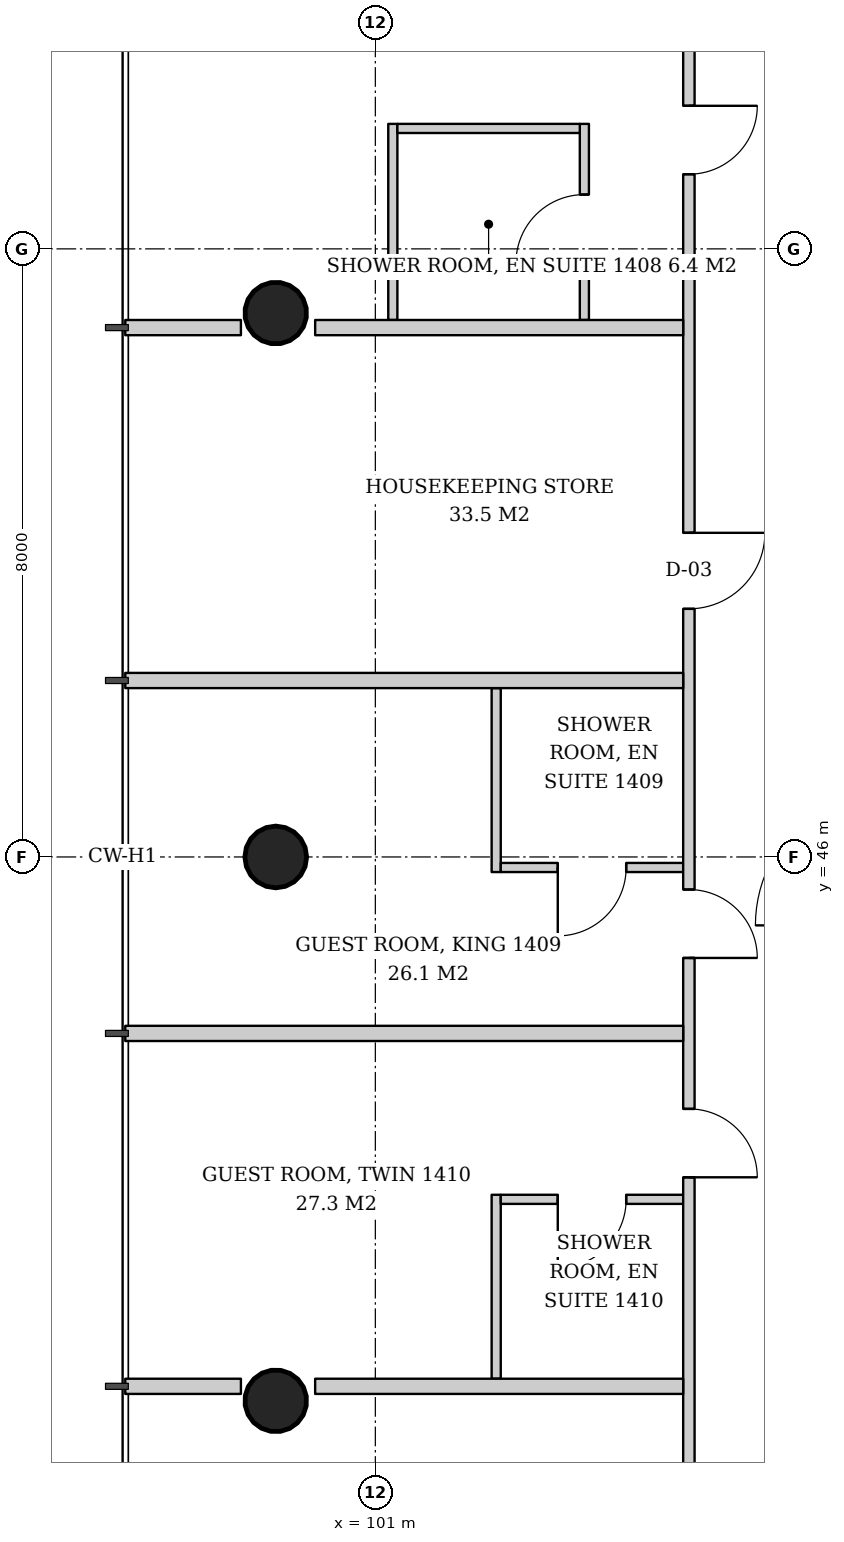
"""IFC4 building model, lengths in metres.
Left out: names, types, materials, properties, quantities, classifications, styles, units other than length and angle.
Written with IfcOpenShell. Run it as: python <this file> out.ifc"""

import sys

from ifc_helpers import new_model, si_unit, direction, frame, frame_2d, origin, origin_2d, place, context, subcontext, project, spatial, rectangle, hollow_circle, extrude, element, fill, save


model = new_model("IFC4")
c1 = context("Model", 3, precision=1e-05, world=origin(), true_north=direction((0.0, 1.0)))
c2 = subcontext(c1, "Body", "Model", "MODEL_VIEW")
j1 = project(units=[si_unit("LENGTHUNIT", "METRE"), si_unit("PLANEANGLEUNIT", "RADIAN")], contexts=[c1])
p1 = place(None, origin())
s1 = spatial("IfcSite", under=j1, at=p1, CompositionType="ELEMENT")
p2 = place(p1, origin())
s2 = spatial("IfcBuilding", under=s1, at=p2, CompositionType="ELEMENT")
p3 = place(p2, frame((0.0, 0.0, 59.0)))
s3 = spatial("IfcBuildingStorey", under=s2, at=p3, CompositionType="ELEMENT", Elevation=59.0)
p4 = place(p3, frame((99.638, 53.181, 0.0), z_axis=(0.043059525333, -0.021561848751, 0.998839808957), x_axis=(0.44774654769, 0.894160516368, 0.0)))
e1 = element("IfcColumn", 1, at=p4, inside=s3, PredefinedType="COLUMN", context=c2, shape_type="SweptSolid", body=[
    extrude(hollow_circle(Radius=0.406, WallThickness=0.03, at=origin_2d()), origin(), (0.0, 0.0, 1.0), 3.804),
])
p5 = place(p3, frame((99.638, 46.0, 0.0), z_axis=(0.043069538298, 0.0, 0.999072076915), x_axis=(0.0, 1.0, 0.0)))
e2 = element("IfcColumn", 2, at=p5, inside=s3, PredefinedType="COLUMN", context=c2, shape_type="SweptSolid", body=[
    extrude(hollow_circle(Radius=0.406, WallThickness=0.03, at=origin_2d()), origin(), (0.0, 0.0, 1.0), 3.803),
])
p6 = place(p3, frame((99.638, 38.819, 0.0), z_axis=(0.043059525333, 0.021561848751, 0.998839808957), x_axis=(-0.44774654769, 0.894160516368, 0.0)))
e3 = element("IfcColumn", 3, at=p6, inside=s3, PredefinedType="COLUMN", context=c2, shape_type="SweptSolid", body=[
    extrude(hollow_circle(Radius=0.406, WallThickness=0.03, at=origin_2d()), origin(), (0.0, 0.0, 1.0), 3.804),
])
p7 = place(p3, frame((103.75, 53.064, 0.0), z_axis=(0.0, 0.0, 1.0), x_axis=(0.0, 1.0, 0.0)))
e4 = element("IfcWall", 4, at=p7, inside=s3, PredefinedType="PARTITIONING", context=c2, shape_type="SweptSolid", body=[
    extrude(rectangle(XDim=2.58, YDim=0.12, at=frame_2d((1.29, 0.0))), origin(), (0.0, 0.0, 1.0), 2.8),
])
p8 = place(p7, frame((0.75, 0.0, 0.0)))
e5 = element("IfcOpeningElement", 5, at=p8, cuts=e4, PredefinedType="OPENING", context=c2, shape_type="SweptSolid", body=[
    extrude(rectangle(XDim=0.9, YDim=2.1, at=frame_2d((0.45, 1.05))), frame((0.0, 0.07, 0.0), z_axis=(0.0, -1.0, 0.0), x_axis=(1.0, 0.0, 0.0)), (0.0, 0.0, 1.0), 0.14),
])
p9 = place(p3, frame((101.23, 53.064, 0.0), z_axis=(0.0, 0.0, 1.0), x_axis=(0.0, 1.0, 0.0)))
e6 = element("IfcWall", 6, at=p9, inside=s3, PredefinedType="PARTITIONING", context=c2, shape_type="SweptSolid", body=[
    extrude(rectangle(XDim=2.58, YDim=0.12, at=frame_2d((1.29, 0.0))), origin(), (0.0, 0.0, 1.0), 2.8),
])
p10 = place(p3, frame((103.69, 55.584, 0.0), z_axis=(0.0, 0.0, 1.0), x_axis=(-1.0, 0.0, 0.0)))
e7 = element("IfcWall", 7, at=p10, inside=s3, PredefinedType="PARTITIONING", context=c2, shape_type="SweptSolid", body=[
    extrude(rectangle(XDim=2.4, YDim=0.12, at=frame_2d((1.2, 0.0))), origin(), (0.0, 0.0, 1.0), 3.6),
])
p11 = place(p3, frame((102.59, 48.221, 0.0), z_axis=(0.0, 0.0, 1.0), x_axis=(0.0, -1.0, 0.0)))
e8 = element("IfcWall", 8, at=p11, inside=s3, PredefinedType="PARTITIONING", context=c2, shape_type="SweptSolid", body=[
    extrude(rectangle(XDim=2.42, YDim=0.12, at=frame_2d((1.21, 0.0))), origin(), (0.0, 0.0, 1.0), 2.847),
])
p12 = place(p3, frame((105.05, 45.861, 0.0), z_axis=(0.0, 0.0, 1.0), x_axis=(-1.0, 0.0, 0.0)))
e9 = element("IfcWall", 9, at=p12, inside=s3, PredefinedType="PARTITIONING", context=c2, shape_type="SweptSolid", body=[
    extrude(rectangle(XDim=2.4, YDim=0.12, at=frame_2d((1.2, 0.0))), origin(), (0.0, 0.0, 1.0), 3.6),
])
p13 = place(p12, frame((0.75, 0.0, 0.0)))
e10 = element("IfcOpeningElement", 10, at=p13, cuts=e9, PredefinedType="OPENING", context=c2, shape_type="SweptSolid", body=[
    extrude(rectangle(XDim=0.9, YDim=2.1, at=frame_2d((0.45, 1.05))), frame((0.0, 0.07, 0.0), z_axis=(0.0, -1.0, 0.0), x_axis=(1.0, 0.0, 0.0)), (0.0, 0.0, 1.0), 0.14),
])
p14 = place(p3, frame((102.59, 41.556, 0.0), z_axis=(0.0, 0.0, 1.0), x_axis=(0.0, -1.0, 0.0)))
e11 = element("IfcWall", 11, at=p14, inside=s3, PredefinedType="PARTITIONING", context=c2, shape_type="SweptSolid", body=[
    extrude(rectangle(XDim=2.42, YDim=0.12, at=frame_2d((1.21, 0.0))), origin(), (0.0, 0.0, 1.0), 3.6),
])
p15 = place(p3, frame((105.05, 41.496, 0.0), z_axis=(0.0, 0.0, 1.0), x_axis=(-1.0, 0.0, 0.0)))
e12 = element("IfcWall", 12, at=p15, inside=s3, PredefinedType="PARTITIONING", context=c2, shape_type="SweptSolid", body=[
    extrude(rectangle(XDim=2.4, YDim=0.12, at=frame_2d((1.2, 0.0))), origin(), (0.0, 0.0, 1.0), 3.6),
])
p16 = place(p15, frame((0.75, 0.0, 0.0)))
e13 = element("IfcOpeningElement", 13, at=p16, cuts=e12, PredefinedType="OPENING", context=c2, shape_type="SweptSolid", body=[
    extrude(rectangle(XDim=0.9, YDim=2.1, at=frame_2d((0.45, 1.05))), frame((0.0, 0.07, 0.0), z_axis=(0.0, -1.0, 0.0), x_axis=(1.0, 0.0, 0.0)), (0.0, 0.0, 1.0), 0.14),
])
p17 = place(p3, frame((105.125, 57.95, 0.0), z_axis=(0.0, 0.0, 1.0), x_axis=(0.0, -1.0, 0.0)))
e14 = element("IfcWall", 14, at=p17, inside=s3, PredefinedType="PARTITIONING", context=c2, shape_type="SweptSolid", body=[
    extrude(rectangle(XDim=23.75, YDim=0.15, at=frame_2d((11.875, 0.0))), origin(), (0.0, 0.0, 1.0), 2.8),
])
p18 = place(p17, frame((2.068, 0.0, 0.0)))
e15 = element("IfcOpeningElement", 15, at=p18, cuts=e14, PredefinedType="OPENING", context=c2, shape_type="SweptSolid", body=[
    extrude(rectangle(XDim=0.9, YDim=2.1, at=frame_2d((0.45, 1.05))), frame((0.0, 0.085, 0.0), z_axis=(0.0, -1.0, 0.0), x_axis=(1.0, 0.0, 0.0)), (0.0, 0.0, 1.0), 0.17),
])
p19 = place(p17, frame((7.686, 0.0, 0.0)))
e16 = element("IfcOpeningElement", 16, at=p19, cuts=e14, PredefinedType="OPENING", context=c2, shape_type="SweptSolid", body=[
    extrude(rectangle(XDim=1.0, YDim=2.1, at=frame_2d((0.5, 1.05))), frame((0.0, 0.085, 0.0), z_axis=(0.0, -1.0, 0.0), x_axis=(1.0, 0.0, 0.0)), (0.0, 0.0, 1.0), 0.17),
])
p20 = place(p17, frame((12.379, 0.0, 0.0)))
e17 = element("IfcOpeningElement", 17, at=p20, cuts=e14, PredefinedType="OPENING", context=c2, shape_type="SweptSolid", body=[
    extrude(rectangle(XDim=0.9, YDim=2.1, at=frame_2d((0.45, 1.05))), frame((0.0, 0.085, 0.0), z_axis=(0.0, -1.0, 0.0), x_axis=(1.0, 0.0, 0.0)), (0.0, 0.0, 1.0), 0.17),
])
p21 = place(p17, frame((15.264, 0.0, 0.0)))
e18 = element("IfcOpeningElement", 18, at=p21, cuts=e14, PredefinedType="OPENING", context=c2, shape_type="SweptSolid", body=[
    extrude(rectangle(XDim=0.9, YDim=2.1, at=frame_2d((0.45, 1.05))), frame((0.0, 0.085, 0.0), z_axis=(0.0, -1.0, 0.0), x_axis=(1.0, 0.0, 0.0)), (0.0, 0.0, 1.0), 0.17),
])
p22 = place(p3, frame((105.05, 52.964, 0.0), z_axis=(0.0, 0.0, 1.0), x_axis=(-1.0, 0.0, 0.0)))
e19 = element("IfcWall", 19, at=p22, inside=s3, PredefinedType="PARTITIONING", context=c2, shape_type="SweptSolid", body=[
    extrude(rectangle(XDim=4.842, YDim=0.2, at=frame_2d((2.421, 0.0))), origin(), (0.0, 0.0, 1.0), 3.6),
])
p23 = place(p3, frame((99.231, 52.964, 0.0), z_axis=(0.0, 0.0, 1.0), x_axis=(-1.0, 0.0, 0.0)))
e20 = element("IfcWall", 20, at=p23, inside=s3, PredefinedType="PARTITIONING", context=c2, shape_type="SweptSolid", body=[
    extrude(rectangle(XDim=1.521, YDim=0.2, at=frame_2d((0.761, 0.0))), origin(), (0.0, 0.0, 1.0), 3.6),
])
for number, where, z_axis, x_axis in (
    (21, (105.05, 48.322, 0.0), (0.0, 0.0, 1.0), (-1.0, 0.0, 0.0)),
    (22, (105.05, 43.678, 0.0), (0.0, 0.0, 1.0), (-1.0, 0.0, 0.0)),
):
    element("IfcWall", number, at=place(p3, frame(where, z_axis=z_axis, x_axis=x_axis)), inside=s3, PredefinedType="PARTITIONING", context=c2, shape_type="SweptSolid", body=[
        extrude(rectangle(XDim=7.34, YDim=0.2, at=frame_2d((3.67, 0.0))), origin(), (0.0, 0.0, 1.0), 3.05),
    ])
p24 = place(p3, frame((105.05, 39.036, 0.0), z_axis=(0.0, 0.0, 1.0), x_axis=(-1.0, 0.0, 0.0)))
e23 = element("IfcWall", 23, at=p24, inside=s3, PredefinedType="PARTITIONING", context=c2, shape_type="SweptSolid", body=[
    extrude(rectangle(XDim=4.842, YDim=0.2, at=frame_2d((2.421, 0.0))), origin(), (0.0, 0.0, 1.0), 3.6),
])
p25 = place(p3, frame((99.231, 39.036, 0.0), z_axis=(0.0, 0.0, 1.0), x_axis=(-1.0, 0.0, 0.0)))
e24 = element("IfcWall", 24, at=p25, inside=s3, PredefinedType="PARTITIONING", context=c2, shape_type="SweptSolid", body=[
    extrude(rectangle(XDim=1.521, YDim=0.2, at=frame_2d((0.761, 0.0))), origin(), (0.0, 0.0, 1.0), 3.6),
])
p26 = place(p8, origin())
e25 = element("IfcDoor", 25, at=p26, inside=s3, OperationType="SINGLE_SWING_LEFT", PredefinedType="DOOR", context=c2, shape_type="SweptSolid", body=[
    extrude(rectangle(XDim=0.9, YDim=2.1, at=frame_2d((0.45, 1.05))), frame((0.0, 0.025, 0.0), z_axis=(0.0, -1.0, 0.0), x_axis=(1.0, 0.0, 0.0)), (0.0, 0.0, 1.0), 0.05),
])
fill(e5, e25)
p27 = place(p13, origin())
e26 = element("IfcDoor", 26, at=p27, inside=s3, OperationType="SINGLE_SWING_RIGHT", PredefinedType="DOOR", context=c2, shape_type="SweptSolid", body=[
    extrude(rectangle(XDim=0.9, YDim=2.1, at=frame_2d((0.45, 1.05))), frame((0.0, 0.025, 0.0), z_axis=(0.0, -1.0, 0.0), x_axis=(1.0, 0.0, 0.0)), (0.0, 0.0, 1.0), 0.05),
])
fill(e10, e26)
p28 = place(p16, origin())
e27 = element("IfcDoor", 27, at=p28, inside=s3, OperationType="SINGLE_SWING_RIGHT", PredefinedType="DOOR", context=c2, shape_type="SweptSolid", body=[
    extrude(rectangle(XDim=0.9, YDim=2.1, at=frame_2d((0.45, 1.05))), frame((0.0, 0.025, 0.0), z_axis=(0.0, -1.0, 0.0), x_axis=(1.0, 0.0, 0.0)), (0.0, 0.0, 1.0), 0.05),
])
fill(e13, e27)
p29 = place(p18, origin())
e28 = element("IfcDoor", 28, at=p29, inside=s3, OperationType="SINGLE_SWING_LEFT", PredefinedType="DOOR", context=c2, shape_type="SweptSolid", body=[
    extrude(rectangle(XDim=0.9, YDim=2.1, at=frame_2d((0.45, 1.05))), frame((0.0, 0.025, 0.0), z_axis=(0.0, -1.0, 0.0), x_axis=(1.0, 0.0, 0.0)), (0.0, 0.0, 1.0), 0.05),
])
fill(e15, e28)
p30 = place(p19, origin())
e29 = element("IfcDoor", 29, at=p30, inside=s3, OperationType="SINGLE_SWING_LEFT", PredefinedType="DOOR", context=c2, shape_type="SweptSolid", body=[
    extrude(rectangle(XDim=1.0, YDim=2.1, at=frame_2d((0.5, 1.05))), frame((0.0, 0.025, 0.0), z_axis=(0.0, -1.0, 0.0), x_axis=(1.0, 0.0, 0.0)), (0.0, 0.0, 1.0), 0.05),
])
fill(e16, e29)
p31 = place(p20, origin())
e30 = element("IfcDoor", 30, at=p31, inside=s3, OperationType="SINGLE_SWING_RIGHT", PredefinedType="DOOR", context=c2, shape_type="SweptSolid", body=[
    extrude(rectangle(XDim=0.9, YDim=2.1, at=frame_2d((0.45, 1.05))), frame((0.0, 0.025, 0.0), z_axis=(0.0, -1.0, 0.0), x_axis=(1.0, 0.0, 0.0)), (0.0, 0.0, 1.0), 0.05),
])
fill(e17, e30)
p32 = place(p21, origin())
e31 = element("IfcDoor", 31, at=p32, inside=s3, OperationType="SINGLE_SWING_RIGHT", PredefinedType="DOOR", context=c2, shape_type="SweptSolid", body=[
    extrude(rectangle(XDim=0.9, YDim=2.1, at=frame_2d((0.45, 1.05))), frame((0.0, 0.025, 0.0), z_axis=(0.0, -1.0, 0.0), x_axis=(1.0, 0.0, 0.0)), (0.0, 0.0, 1.0), 0.05),
])
fill(e18, e31)
save(model, sys.argv[1])
